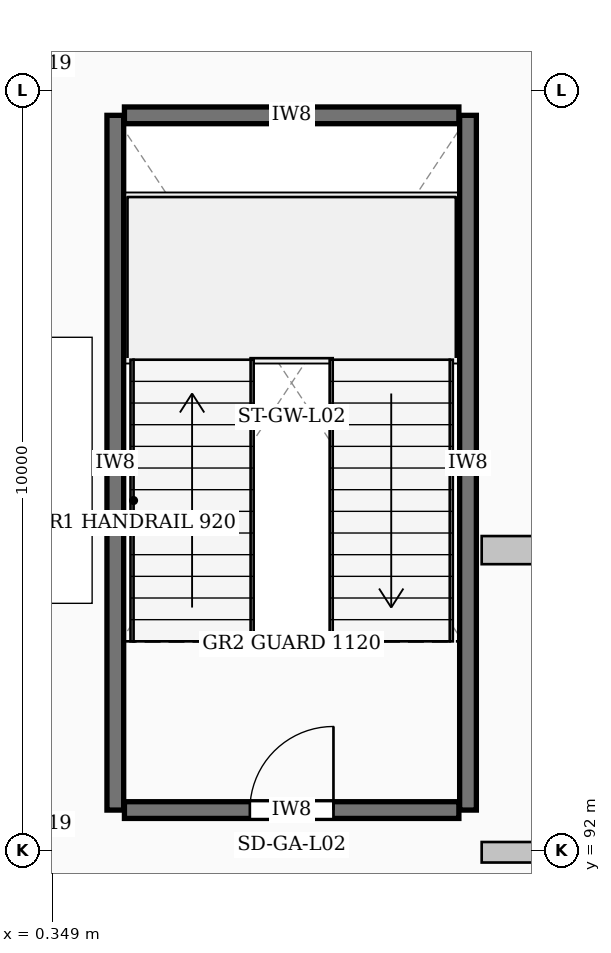
"""IFC4 building model, lengths in metres.
Left out: names, types, materials, properties, quantities, classifications, styles, units other than length and angle.
Written with IfcOpenShell. Run it as: python <this file> out.ifc"""

import sys

from ifc_helpers import new_model, si_unit, direction, frame, frame_2d, origin, place, context, subcontext, project, spatial, rectangle, extrude, element, fill, save


model = new_model("IFC4")
c1 = context("Model", 3, precision=1e-05, world=origin(), true_north=direction((0.0, 1.0)))
c2 = subcontext(c1, "Body", "Model", "MODEL_VIEW")
j1 = project(units=[si_unit("LENGTHUNIT", "METRE"), si_unit("PLANEANGLEUNIT", "RADIAN")], contexts=[c1])
p1 = place(None, origin())
s1 = spatial("IfcSite", under=j1, at=p1, CompositionType="ELEMENT")
p2 = place(p1, origin())
s2 = spatial("IfcBuilding", under=s1, at=p2, CompositionType="ELEMENT")
p3 = place(p2, frame((0.0, 0.0, 9.6)))
s3 = spatial("IfcBuildingStorey", under=s2, at=p3, CompositionType="ELEMENT", Elevation=9.6)
for number, where, z_axis, x_axis in (
    (1, (1.18, 92.53, 0.0), (0.0, 0.0, 1.0), (0.0, 1.0, 0.0)),
    (2, (5.82, 92.53, 0.0), (0.0, 0.0, 1.0), (0.0, 1.0, 0.0)),
):
    element("IfcWall", number, at=place(p3, frame(where, z_axis=z_axis, x_axis=x_axis)), inside=s3, PredefinedType="SHEAR", context=c2, shape_type="SweptSolid", body=[
        extrude(rectangle(XDim=9.14, YDim=0.22, at=frame_2d((4.57, 0.0))), origin(), (0.0, 0.0, 1.0), 4.56),
    ])
p4 = place(p3, frame((1.3, 101.67, 0.0), z_axis=(0.0, 0.0, 1.0), x_axis=(1.0, 0.0, 0.0)))
e3 = element("IfcWall", 3, at=p4, inside=s3, PredefinedType="SHEAR", context=c2, shape_type="SweptSolid", body=[
    extrude(rectangle(XDim=4.4, YDim=0.22, at=frame_2d((2.2, 0.0))), origin(), (0.0, 0.0, 1.0), 4.56),
])
p5 = place(p3, frame((1.3, 92.53, 0.0), z_axis=(0.0, 0.0, 1.0), x_axis=(1.0, 0.0, 0.0)))
e4 = element("IfcWall", 4, at=p5, inside=s3, PredefinedType="SHEAR", context=c2, shape_type="SweptSolid", body=[
    extrude(rectangle(XDim=4.4, YDim=0.22, at=frame_2d((2.2, 0.0))), origin(), (0.0, 0.0, 1.0), 4.56),
])
p6 = place(p5, frame((1.65, 0.0, 0.0)))
e5 = element("IfcOpeningElement", 5, at=p6, cuts=e4, PredefinedType="OPENING", context=c2, shape_type="SweptSolid", body=[
    extrude(rectangle(XDim=1.1, YDim=2.2, at=frame_2d((0.55, 1.1))), frame((0.0, 0.12, 0.0), z_axis=(0.0, -1.0, 0.0), x_axis=(1.0, 0.0, 0.0)), (0.0, 0.0, 1.0), 0.24),
])
p7 = place(p3, frame((6.0, 91.975, 0.0), z_axis=(0.0, 0.0, 1.0), x_axis=(1.0, 0.0, 0.0)))
e6 = element("IfcWall", 6, at=p7, inside=s3, PredefinedType="PARTITIONING", context=c2, shape_type="SweptSolid", body=[
    extrude(rectangle(XDim=4.62, YDim=0.27, at=frame_2d((2.31, 0.0))), origin(), (0.0, 0.0, 1.0), 4.119),
])
p8 = place(p7, frame((1.635, 0.0, 0.0)))
e7 = element("IfcOpeningElement", 7, at=p8, cuts=e6, PredefinedType="OPENING", context=c2, shape_type="SweptSolid", body=[
    extrude(rectangle(XDim=1.35, YDim=2.35, at=frame_2d((0.675, 1.175))), frame((0.0, 0.145, 0.0), z_axis=(0.0, -1.0, 0.0), x_axis=(1.0, 0.0, 0.0)), (0.0, 0.0, 1.0), 0.29),
])
p9 = place(p3, frame((6.0, 95.95, 0.0), z_axis=(0.0, 0.0, 1.0), x_axis=(1.0, 0.0, 0.0)))
e8 = element("IfcWall", 8, at=p9, inside=s3, PredefinedType="PARTITIONING", context=c2, shape_type="SweptSolid", body=[
    extrude(rectangle(XDim=15.42, YDim=0.37, at=frame_2d((7.71, 0.0))), origin(), (0.0, 0.0, 1.0), 4.52),
])
p10 = place(p9, frame((6.885, 0.0, 0.0)))
e9 = element("IfcOpeningElement", 9, at=p10, cuts=e8, PredefinedType="OPENING", context=c2, shape_type="SweptSolid", body=[
    extrude(rectangle(XDim=1.65, YDim=2.4, at=frame_2d((0.825, 1.2))), frame((0.0, 0.195, 0.0), z_axis=(0.0, -1.0, 0.0), x_axis=(1.0, 0.0, 0.0)), (0.0, 0.0, 1.0), 0.39),
])
p11 = place(p6, origin())
e10 = element("IfcDoor", 10, at=p11, inside=s3, OperationType="SINGLE_SWING_RIGHT", PredefinedType="DOOR", context=c2, shape_type="SweptSolid", body=[
    extrude(rectangle(XDim=1.1, YDim=2.2, at=frame_2d((0.55, 1.1))), frame((0.0, 0.025, 0.0), z_axis=(0.0, -1.0, 0.0), x_axis=(1.0, 0.0, 0.0)), (0.0, 0.0, 1.0), 0.05),
])
fill(e5, e10)
save(model, sys.argv[1])
